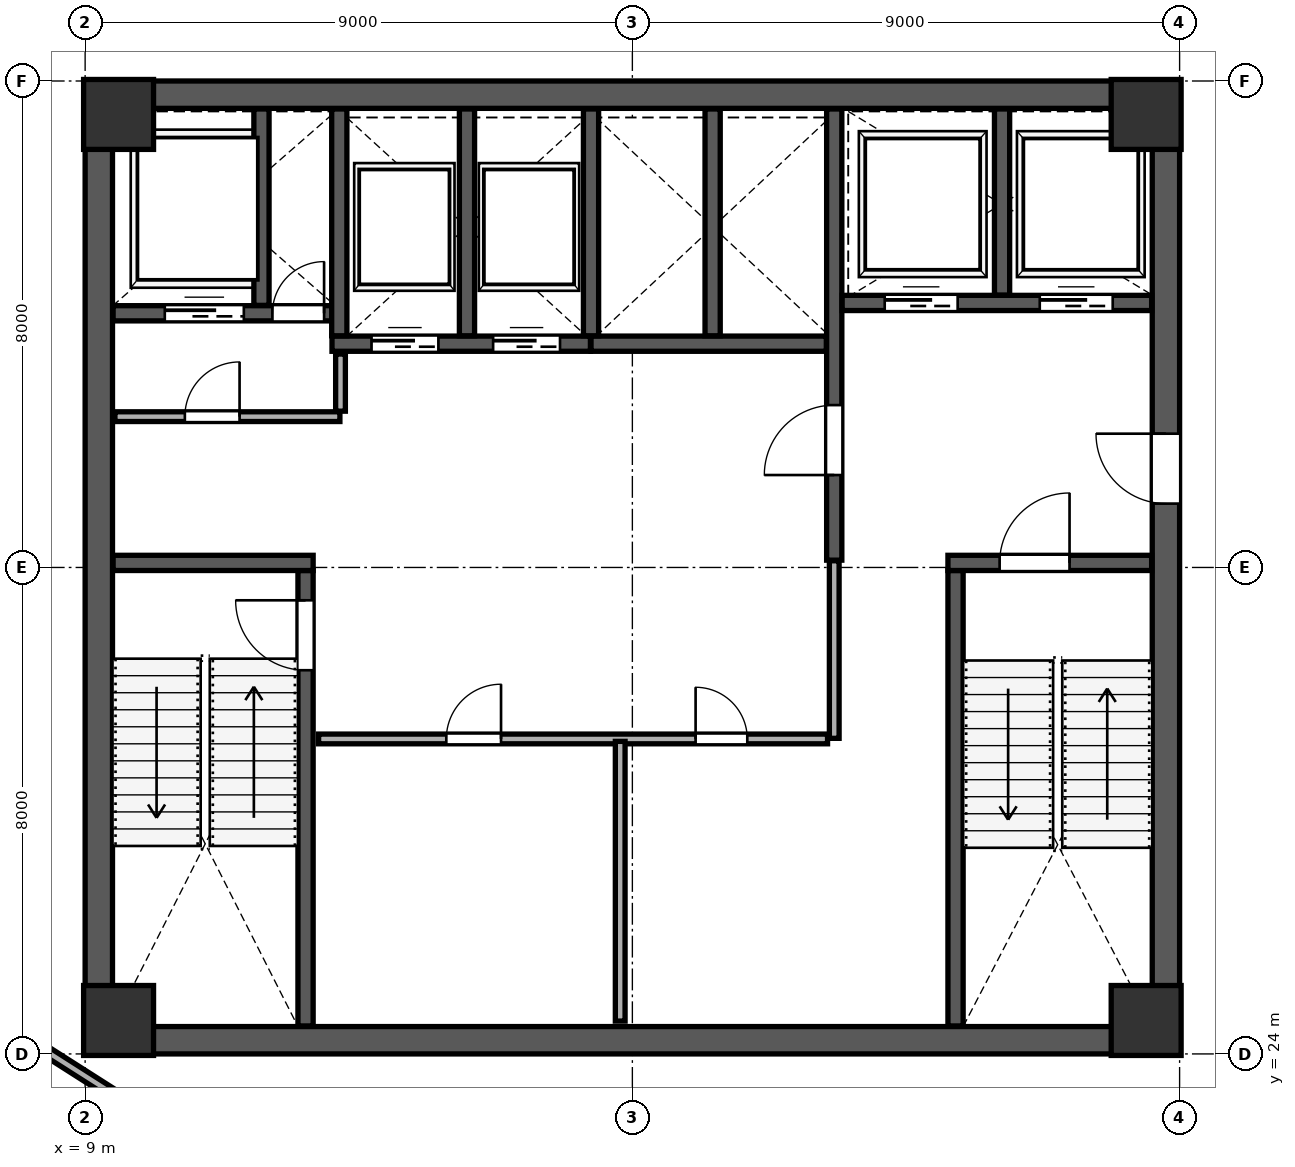
"""IFC4 building model, lengths in metres.
Left out: names, types, materials, properties, quantities, classifications, styles, units other than length and angle.
Written with IfcOpenShell. Run it as: python <this file> out.ifc"""

import sys

from ifc_helpers import new_model, si_unit, direction, frame, frame_2d, origin, origin_2d, place, context, subcontext, project, spatial, rectangle, extrude, source, transform, mapped, element, fill, save


model = new_model("IFC4")
c1 = context("Model", 3, precision=1e-05, world=origin(), true_north=direction((0.0, 1.0)))
c2 = subcontext(c1, "Body", "Model", "MODEL_VIEW")
j1 = project(units=[si_unit("LENGTHUNIT", "METRE"), si_unit("PLANEANGLEUNIT", "RADIAN")], contexts=[c1])
p1 = place(None, origin())
s1 = spatial("IfcSite", under=j1, at=p1, CompositionType="ELEMENT")
p2 = place(p1, origin())
s2 = spatial("IfcBuilding", under=s1, at=p2, CompositionType="ELEMENT")
p3 = place(p2, frame((0.0, 0.0, 187.6)))
s3 = spatial("IfcBuildingStorey", under=s2, at=p3, CompositionType="ELEMENT", Elevation=187.6)
m1 = source(origin(), c2, "Body", "SweptSolid", [
    extrude(rectangle(XDim=1.15, YDim=1.15, at=origin_2d()), origin(), (0.0, 0.0, 1.0), 4.198),
])
for number, where, z_axis, x_axis in (
    (1, (9.55, 24.55, 0.001), (0.0, 0.0, 1.0), (1.0, 0.0, 0.0)),
    (2, (26.45, 24.55, 0.001), (0.0, 0.0, 1.0), (1.0, 0.0, 0.0)),
    (3, (9.55, 39.45, 0.001), (0.0, 0.0, 1.0), (1.0, 0.0, 0.0)),
    (4, (26.45, 39.45, 0.001), (0.0, 0.0, 1.0), (1.0, 0.0, 0.0)),
):
    element("IfcColumn", number, at=place(p3, frame(where, z_axis=z_axis, x_axis=x_axis)), inside=s3, PredefinedType="COLUMN", context=c2, shape_type="MappedRepresentation", body=[
        mapped(m1, transform((0.0, 0.0, 0.0), scale=1.0)),
    ])
p4 = place(p3, frame((9.225, 24.45, 0.0), z_axis=(0.0, 0.0, 1.0), x_axis=(0.0, 1.0, 0.0)))
e5 = element("IfcWall", 5, at=p4, inside=s3, PredefinedType="SHEAR", context=c2, shape_type="SweptSolid", body=[
    extrude(rectangle(XDim=15.1, YDim=0.45, at=frame_2d((7.55, 0.0))), origin(), (0.0, 0.0, 1.0), 3.96),
])
p5 = place(p3, frame((26.775, 24.45, 0.0), z_axis=(0.0, 0.0, 1.0), x_axis=(0.0, 1.0, 0.0)))
e6 = element("IfcWall", 6, at=p5, inside=s3, PredefinedType="SHEAR", context=c2, shape_type="SweptSolid", body=[
    extrude(rectangle(XDim=15.1, YDim=0.45, at=frame_2d((7.55, 0.0))), origin(), (0.0, 0.0, 1.0), 3.96),
])
p6 = place(p5, frame((8.6, 0.0, 0.0)))
e7 = element("IfcOpeningElement", 7, at=p6, cuts=e6, PredefinedType="OPENING", context=c2, shape_type="SweptSolid", body=[
    extrude(rectangle(XDim=1.15, YDim=2.2, at=frame_2d((0.575, 1.1))), frame((0.0, 0.235, 0.0), z_axis=(0.0, -1.0, 0.0), x_axis=(1.0, 0.0, 0.0)), (0.0, 0.0, 1.0), 0.47),
])
for number, where, z_axis, x_axis in (
    (8, (9.0, 24.225, 0.0), (0.0, 0.0, 1.0), (1.0, 0.0, 0.0)),
    (9, (9.0, 39.775, 0.0), (0.0, 0.0, 1.0), (1.0, 0.0, 0.0)),
):
    element("IfcWall", number, at=place(p3, frame(where, z_axis=z_axis, x_axis=x_axis)), inside=s3, PredefinedType="SHEAR", context=c2, shape_type="SweptSolid", body=[
        extrude(rectangle(XDim=18.0, YDim=0.45, at=frame_2d((9.0, 0.0))), origin(), (0.0, 0.0, 1.0), 3.96),
    ])
p7 = place(p3, frame((12.625, 24.46, 0.0), z_axis=(0.0, 0.0, 1.0), x_axis=(0.0, 1.0, 0.0)))
e10 = element("IfcWall", 10, at=p7, inside=s3, PredefinedType="SHEAR", context=c2, shape_type="SweptSolid", body=[
    extrude(rectangle(XDim=7.49, YDim=0.25, at=frame_2d((3.745, 0.0))), origin(), (0.0, 0.0, 1.0), 3.96),
])
p8 = place(p7, frame((5.85, 0.0, 0.0)))
e11 = element("IfcOpeningElement", 11, at=p8, cuts=e10, PredefinedType="OPENING", context=c2, shape_type="SweptSolid", body=[
    extrude(rectangle(XDim=1.15, YDim=2.2, at=frame_2d((0.575, 1.1))), frame((0.0, 0.135, 0.0), z_axis=(0.0, -1.0, 0.0), x_axis=(1.0, 0.0, 0.0)), (0.0, 0.0, 1.0), 0.27),
])
p9 = place(p3, frame((9.46, 32.075, 0.0), z_axis=(0.0, 0.0, 1.0), x_axis=(1.0, 0.0, 0.0)))
e12 = element("IfcWall", 12, at=p9, inside=s3, PredefinedType="SHEAR", context=c2, shape_type="SweptSolid", body=[
    extrude(rectangle(XDim=3.29, YDim=0.25, at=frame_2d((1.645, 0.0))), origin(), (0.0, 0.0, 1.0), 3.96),
])
p10 = place(p3, frame((23.315, 24.46, 0.0), z_axis=(0.0, 0.0, 1.0), x_axis=(0.0, 1.0, 0.0)))
e13 = element("IfcWall", 13, at=p10, inside=s3, PredefinedType="SHEAR", context=c2, shape_type="SweptSolid", body=[
    extrude(rectangle(XDim=7.49, YDim=0.25, at=frame_2d((3.745, 0.0))), origin(), (0.0, 0.0, 1.0), 3.96),
])
p11 = place(p3, frame((23.19, 32.075, 0.0), z_axis=(0.0, 0.0, 1.0), x_axis=(1.0, 0.0, 0.0)))
e14 = element("IfcWall", 14, at=p11, inside=s3, PredefinedType="SHEAR", context=c2, shape_type="SweptSolid", body=[
    extrude(rectangle(XDim=3.35, YDim=0.25, at=frame_2d((1.675, 0.0))), origin(), (0.0, 0.0, 1.0), 3.96),
])
p12 = place(p11, frame((0.85, 0.0, 0.0)))
e15 = element("IfcOpeningElement", 15, at=p12, cuts=e14, PredefinedType="OPENING", context=c2, shape_type="SweptSolid", body=[
    extrude(rectangle(XDim=1.15, YDim=2.2, at=frame_2d((0.575, 1.1))), frame((0.0, 0.135, 0.0), z_axis=(0.0, -1.0, 0.0), x_axis=(1.0, 0.0, 0.0)), (0.0, 0.0, 1.0), 0.27),
])
p13 = place(p3, frame((21.32, 32.12, 0.0), z_axis=(0.0, 0.0, 1.0), x_axis=(0.0, 1.0, 0.0)))
e16 = element("IfcWall", 16, at=p13, inside=s3, PredefinedType="SHEAR", context=c2, shape_type="SweptSolid", body=[
    extrude(rectangle(XDim=7.42, YDim=0.25, at=frame_2d((3.71, 0.0))), origin(), (0.0, 0.0, 1.0), 3.96),
])
p14 = place(p13, frame((1.4, 0.0, 0.0)))
e17 = element("IfcOpeningElement", 17, at=p14, cuts=e16, PredefinedType="OPENING", context=c2, shape_type="SweptSolid", body=[
    extrude(rectangle(XDim=1.15, YDim=2.2, at=frame_2d((0.575, 1.1))), frame((0.0, 0.135, 0.0), z_axis=(0.0, -1.0, 0.0), x_axis=(1.0, 0.0, 0.0)), (0.0, 0.0, 1.0), 0.27),
])
p15 = place(p3, frame((9.46, 36.18, 0.0), z_axis=(0.0, 0.0, 1.0), x_axis=(1.0, 0.0, 0.0)))
e18 = element("IfcWall", 18, at=p15, inside=s3, PredefinedType="SHEAR", context=c2, shape_type="SweptSolid", body=[
    extrude(rectangle(XDim=3.79, YDim=0.25, at=frame_2d((1.895, 0.0))), origin(), (0.0, 0.0, 1.0), 3.96),
])
p16 = place(p15, frame((2.62, 0.0, 0.0)))
e19 = element("IfcOpeningElement", 19, at=p16, cuts=e18, PredefinedType="OPENING", context=c2, shape_type="SweptSolid", body=[
    extrude(rectangle(XDim=0.85, YDim=2.1, at=frame_2d((0.425, 1.05))), frame((0.0, 0.135, 0.0), z_axis=(0.0, -1.0, 0.0), x_axis=(1.0, 0.0, 0.0)), (0.0, 0.0, 1.0), 0.27),
])
p17 = place(p15, frame((0.85, 0.0, 0.0)))
e20 = element("IfcOpeningElement", 20, at=p17, cuts=e18, PredefinedType="OPENING", context=c2, shape_type="SweptSolid", body=[
    extrude(rectangle(XDim=1.3, YDim=2.25, at=frame_2d((0.65, 1.125))), frame((0.0, 0.135, 0.0), z_axis=(0.0, -1.0, 0.0), x_axis=(1.0, 0.0, 0.0)), (0.0, 0.0, 1.0), 0.27),
])
p18 = place(p3, frame((11.9, 36.31, 0.0), z_axis=(0.0, 0.0, 1.0), x_axis=(0.0, 1.0, 0.0)))
e21 = element("IfcWall", 21, at=p18, inside=s3, PredefinedType="SHEAR", context=c2, shape_type="SweptSolid", body=[
    extrude(rectangle(XDim=3.23, YDim=0.25, at=frame_2d((1.615, 0.0))), origin(), (0.0, 0.0, 1.0), 3.96),
])
p19 = place(p3, frame((21.45, 36.35, 0.0), z_axis=(0.0, 0.0, 1.0), x_axis=(1.0, 0.0, 0.0)))
e22 = element("IfcWall", 22, at=p19, inside=s3, PredefinedType="SHEAR", context=c2, shape_type="SweptSolid", body=[
    extrude(rectangle(XDim=5.09, YDim=0.25, at=frame_2d((2.545, 0.0))), origin(), (0.0, 0.0, 1.0), 3.96),
])
p20 = place(p19, frame((0.7, 0.0, 0.0)))
e23 = element("IfcOpeningElement", 23, at=p20, cuts=e22, PredefinedType="OPENING", context=c2, shape_type="SweptSolid", body=[
    extrude(rectangle(XDim=1.2, YDim=2.2, at=frame_2d((0.6, 1.1))), frame((0.0, 0.135, 0.0), z_axis=(0.0, -1.0, 0.0), x_axis=(1.0, 0.0, 0.0)), (0.0, 0.0, 1.0), 0.27),
])
p21 = place(p19, frame((3.25, 0.0, 0.0)))
e24 = element("IfcOpeningElement", 24, at=p21, cuts=e22, PredefinedType="OPENING", context=c2, shape_type="SweptSolid", body=[
    extrude(rectangle(XDim=1.2, YDim=2.2, at=frame_2d((0.6, 1.1))), frame((0.0, 0.135, 0.0), z_axis=(0.0, -1.0, 0.0), x_axis=(1.0, 0.0, 0.0)), (0.0, 0.0, 1.0), 0.27),
])
p22 = place(p3, frame((24.08, 36.48, 0.0), z_axis=(0.0, 0.0, 1.0), x_axis=(0.0, 1.0, 0.0)))
e25 = element("IfcWall", 25, at=p22, inside=s3, PredefinedType="SHEAR", context=c2, shape_type="SweptSolid", body=[
    extrude(rectangle(XDim=3.06, YDim=0.25, at=frame_2d((1.53, 0.0))), origin(), (0.0, 0.0, 1.0), 3.96),
])
p23 = place(p3, frame((13.06, 35.68, 0.0), z_axis=(0.0, 0.0, 1.0), x_axis=(1.0, 0.0, 0.0)))
e26 = element("IfcWall", 26, at=p23, inside=s3, PredefinedType="SHEAR", context=c2, shape_type="SweptSolid", body=[
    extrude(rectangle(XDim=4.25, YDim=0.25, at=frame_2d((2.125, 0.0))), origin(), (0.0, 0.0, 1.0), 3.96),
])
p24 = place(p23, frame((0.65, 0.0, 0.0)))
e27 = element("IfcOpeningElement", 27, at=p24, cuts=e26, PredefinedType="OPENING", context=c2, shape_type="SweptSolid", body=[
    extrude(rectangle(XDim=1.1, YDim=2.2, at=frame_2d((0.55, 1.1))), frame((0.0, 0.135, 0.0), z_axis=(0.0, -1.0, 0.0), x_axis=(1.0, 0.0, 0.0)), (0.0, 0.0, 1.0), 0.27),
])
p25 = place(p23, frame((2.65, 0.0, 0.0)))
e28 = element("IfcOpeningElement", 28, at=p25, cuts=e26, PredefinedType="OPENING", context=c2, shape_type="SweptSolid", body=[
    extrude(rectangle(XDim=1.1, YDim=2.2, at=frame_2d((0.55, 1.1))), frame((0.0, 0.135, 0.0), z_axis=(0.0, -1.0, 0.0), x_axis=(1.0, 0.0, 0.0)), (0.0, 0.0, 1.0), 0.27),
])
for number, where, z_axis, x_axis in (
    (29, (13.18, 35.81, 0.0), (0.0, 0.0, 1.0), (0.0, 1.0, 0.0)),
    (30, (15.28, 35.81, 0.0), (0.0, 0.0, 1.0), (0.0, 1.0, 0.0)),
):
    element("IfcWall", number, at=place(p3, frame(where, z_axis=z_axis, x_axis=x_axis)), inside=s3, PredefinedType="SHEAR", context=c2, shape_type="SweptSolid", body=[
        extrude(rectangle(XDim=3.73, YDim=0.25, at=frame_2d((1.865, 0.0))), origin(), (0.0, 0.0, 1.0), 3.96),
    ])
p26 = place(p3, frame((17.32, 35.68, 0.0), z_axis=(0.0, 0.0, 1.0), x_axis=(1.0, 0.0, 0.0)))
e31 = element("IfcWall", 31, at=p26, inside=s3, PredefinedType="SHEAR", context=c2, shape_type="SweptSolid", body=[
    extrude(rectangle(XDim=3.87, YDim=0.25, at=frame_2d((1.935, 0.0))), origin(), (0.0, 0.0, 1.0), 3.96),
])
for number, where, z_axis, x_axis in (
    (32, (17.32, 35.81, 0.0), (0.0, 0.0, 1.0), (0.0, 1.0, 0.0)),
    (33, (19.32, 35.81, 0.0), (0.0, 0.0, 1.0), (0.0, 1.0, 0.0)),
):
    element("IfcWall", number, at=place(p3, frame(where, z_axis=z_axis, x_axis=x_axis)), inside=s3, PredefinedType="SHEAR", context=c2, shape_type="SweptSolid", body=[
        extrude(rectangle(XDim=3.73, YDim=0.25, at=frame_2d((1.865, 0.0))), origin(), (0.0, 0.0, 1.0), 3.96),
    ])
p27 = place(p3, frame((9.49, 34.48, 0.0), z_axis=(0.0, 0.0, 1.0), x_axis=(1.0, 0.0, 0.0)))
e34 = element("IfcWall", 34, at=p27, inside=s3, PredefinedType="PARTITIONING", context=c2, shape_type="SweptSolid", body=[
    extrude(rectangle(XDim=3.7, YDim=0.16, at=frame_2d((1.85, 0.0))), origin(), (0.0, 0.0, 1.0), 3.96),
])
p28 = place(p27, frame((1.15, 0.0, 0.0)))
e35 = element("IfcOpeningElement", 35, at=p28, cuts=e34, PredefinedType="OPENING", context=c2, shape_type="SweptSolid", body=[
    extrude(rectangle(XDim=0.9, YDim=2.15, at=frame_2d((0.45, 1.075))), frame((0.0, 0.09, 0.0), z_axis=(0.0, -1.0, 0.0), x_axis=(1.0, 0.0, 0.0)), (0.0, 0.0, 1.0), 0.18),
])
p29 = place(p3, frame((13.2, 34.57, 0.0), z_axis=(0.0, 0.0, 1.0), x_axis=(0.0, 1.0, 0.0)))
e36 = element("IfcWall", 36, at=p29, inside=s3, PredefinedType="PARTITIONING", context=c2, shape_type="SweptSolid", body=[
    extrude(rectangle(XDim=0.94, YDim=0.16, at=frame_2d((0.47, 0.0))), origin(), (0.0, 0.0, 1.0), 3.96),
])
p30 = place(p3, frame((12.84, 29.18, 0.0), z_axis=(0.0, 0.0, 1.0), x_axis=(1.0, 0.0, 0.0)))
e37 = element("IfcWall", 37, at=p30, inside=s3, PredefinedType="PARTITIONING", context=c2, shape_type="SweptSolid", body=[
    extrude(rectangle(XDim=8.37, YDim=0.16, at=frame_2d((4.185, 0.0))), origin(), (0.0, 0.0, 1.0), 3.96),
])
p31 = place(p30, frame((2.1, 0.0, 0.0)))
e38 = element("IfcOpeningElement", 38, at=p31, cuts=e37, PredefinedType="OPENING", context=c2, shape_type="SweptSolid", body=[
    extrude(rectangle(XDim=0.9, YDim=2.15, at=frame_2d((0.45, 1.075))), frame((0.0, 0.09, 0.0), z_axis=(0.0, -1.0, 0.0), x_axis=(1.0, 0.0, 0.0)), (0.0, 0.0, 1.0), 0.18),
])
p32 = place(p30, frame((6.2, 0.0, 0.0)))
e39 = element("IfcOpeningElement", 39, at=p32, cuts=e37, PredefinedType="OPENING", context=c2, shape_type="SweptSolid", body=[
    extrude(rectangle(XDim=0.85, YDim=2.1, at=frame_2d((0.425, 1.05))), frame((0.0, 0.09, 0.0), z_axis=(0.0, -1.0, 0.0), x_axis=(1.0, 0.0, 0.0)), (0.0, 0.0, 1.0), 0.18),
])
p33 = place(p3, frame((17.8, 24.54, 0.0), z_axis=(0.0, 0.0, 1.0), x_axis=(0.0, 1.0, 0.0)))
e40 = element("IfcWall", 40, at=p33, inside=s3, PredefinedType="PARTITIONING", context=c2, shape_type="SweptSolid", body=[
    extrude(rectangle(XDim=4.6, YDim=0.16, at=frame_2d((2.3, 0.0))), origin(), (0.0, 0.0, 1.0), 3.96),
])
p34 = place(p3, frame((21.32, 29.19, 0.0), z_axis=(0.0, 0.0, 1.0), x_axis=(0.0, 1.0, 0.0)))
e41 = element("IfcWall", 41, at=p34, inside=s3, PredefinedType="PARTITIONING", context=c2, shape_type="SweptSolid", body=[
    extrude(rectangle(XDim=2.92, YDim=0.16, at=frame_2d((1.46, 0.0))), origin(), (0.0, 0.0, 1.0), 3.96),
])
p35 = place(p3, frame((6.25, 25.389, 0.0), z_axis=(0.0, 0.0, 1.0), x_axis=(0.843390478307, -0.537301127024, 0.0)))
e42 = element("IfcWall", 42, at=p35, inside=s3, PredefinedType="PARTITIONING", context=c2, shape_type="SweptSolid", body=[
    extrude(rectangle(XDim=20.15, YDim=0.16, at=frame_2d((10.075, 0.0))), origin(), (0.0, 0.0, 1.0), 3.96),
])
p36 = place(p35, frame((0.65, 0.0, 0.0)))
e43 = element("IfcOpeningElement", 43, at=p36, cuts=e42, PredefinedType="OPENING", context=c2, shape_type="SweptSolid", body=[
    extrude(rectangle(XDim=0.95, YDim=2.15, at=frame_2d((0.475, 1.075))), frame((0.0, 0.09, 0.0), z_axis=(0.0, -1.0, 0.0), x_axis=(1.0, 0.0, 0.0)), (0.0, 0.0, 1.0), 0.18),
])
p37 = place(p3, frame((12.747, 50.868, 0.0), z_axis=(0.0, 0.0, 1.0), x_axis=(0.843393047262, -0.537297094567, 0.0)))
e44 = element("IfcWall", 44, at=p37, inside=s3, PredefinedType="PARTITIONING", context=c2, shape_type="SweptSolid", body=[
    extrude(rectangle(XDim=28.36, YDim=0.135, at=frame_2d((14.18, 0.0))), origin(), (0.0, 0.0, 1.0), 3.96),
])
p38 = place(p37, frame((20.31, 0.0, 0.0)))
e45 = element("IfcOpeningElement", 45, at=p38, cuts=e44, PredefinedType="OPENING", context=c2, shape_type="SweptSolid", body=[
    extrude(rectangle(XDim=0.95, YDim=2.15, at=frame_2d((0.475, 1.075))), frame((0.0, 0.078, 0.0), z_axis=(0.0, -1.0, 0.0), x_axis=(1.0, 0.0, 0.0)), (0.0, 0.0, 1.0), 0.155),
])
m2 = source(origin(), c2, "Body", "SweptSolid", [
    extrude(rectangle(XDim=1.15, YDim=2.2, at=frame_2d((0.575, 1.1))), frame((0.0, 0.025, 0.0), z_axis=(0.0, -1.0, 0.0), x_axis=(1.0, 0.0, 0.0)), (0.0, 0.0, 1.0), 0.05),
])
p39 = place(p8, origin())
e46 = element("IfcDoor", 46, at=p39, inside=s3, OperationType="SINGLE_SWING_RIGHT", PredefinedType="DOOR", context=c2, shape_type="MappedRepresentation", body=[
    mapped(m2, transform((0.0, 0.0, 0.0), scale=1.0)),
])
fill(e11, e46)
m3 = source(origin(), c2, "Body", "SweptSolid", [
    extrude(rectangle(XDim=1.15, YDim=2.2, at=frame_2d((0.575, 1.1))), frame((0.0, 0.025, 0.0), z_axis=(0.0, -1.0, 0.0), x_axis=(1.0, 0.0, 0.0)), (0.0, 0.0, 1.0), 0.05),
])
p40 = place(p14, origin())
e47 = element("IfcDoor", 47, at=p40, inside=s3, OperationType="SINGLE_SWING_LEFT", PredefinedType="DOOR", context=c2, shape_type="MappedRepresentation", body=[
    mapped(m3, transform((0.0, 0.0, 0.0), scale=1.0)),
])
fill(e17, e47)
p41 = place(p12, origin())
e48 = element("IfcDoor", 48, at=p41, inside=s3, OperationType="SINGLE_SWING_RIGHT", PredefinedType="DOOR", context=c2, shape_type="MappedRepresentation", body=[
    mapped(m2, transform((0.0, 0.0, 0.0), scale=1.0)),
])
fill(e15, e48)
p42 = place(p6, origin())
e49 = element("IfcDoor", 49, at=p42, inside=s3, OperationType="SINGLE_SWING_RIGHT", PredefinedType="DOOR", context=c2, shape_type="MappedRepresentation", body=[
    mapped(m3, transform((0.0, 0.0, 0.0), scale=1.0)),
])
fill(e7, e49)
m4 = source(origin(), c2, "Body", "SweptSolid", [
    extrude(rectangle(XDim=0.85, YDim=2.1, at=frame_2d((0.425, 1.05))), frame((0.0, 0.025, 0.0), z_axis=(0.0, -1.0, 0.0), x_axis=(1.0, 0.0, 0.0)), (0.0, 0.0, 1.0), 0.05),
])
p43 = place(p16, origin())
e50 = element("IfcDoor", 50, at=p43, inside=s3, OperationType="SINGLE_SWING_RIGHT", PredefinedType="DOOR", context=c2, shape_type="MappedRepresentation", body=[
    mapped(m4, transform((0.0, 0.0, 0.0), scale=1.0)),
])
fill(e19, e50)
m5 = source(origin(), c2, "Body", "SweptSolid", [
    extrude(rectangle(XDim=1.1, YDim=2.2, at=frame_2d((0.55, 1.1))), frame((0.0, 0.025, 0.0), z_axis=(0.0, -1.0, 0.0), x_axis=(1.0, 0.0, 0.0)), (0.0, 0.0, 1.0), 0.05),
])
p44 = place(p24, origin())
e51 = element("IfcDoor", 51, at=p44, inside=s3, OperationType="SLIDING_TO_LEFT", PredefinedType="DOOR", context=c2, shape_type="MappedRepresentation", body=[
    mapped(m5, transform((0.0, 0.0, 0.0), scale=1.0)),
])
fill(e27, e51)
p45 = place(p25, origin())
e52 = element("IfcDoor", 52, at=p45, inside=s3, OperationType="SLIDING_TO_RIGHT", PredefinedType="DOOR", context=c2, shape_type="MappedRepresentation", body=[
    mapped(m5, transform((0.0, 0.0, 0.0), scale=1.0)),
])
fill(e28, e52)
m6 = source(origin(), c2, "Body", "SweptSolid", [
    extrude(rectangle(XDim=1.2, YDim=2.2, at=frame_2d((0.6, 1.1))), frame((0.0, 0.025, 0.0), z_axis=(0.0, -1.0, 0.0), x_axis=(1.0, 0.0, 0.0)), (0.0, 0.0, 1.0), 0.05),
])
p46 = place(p20, origin())
e53 = element("IfcDoor", 53, at=p46, inside=s3, OperationType="SLIDING_TO_LEFT", PredefinedType="DOOR", context=c2, shape_type="MappedRepresentation", body=[
    mapped(m6, transform((0.0, 0.0, 0.0), scale=1.0)),
])
fill(e23, e53)
p47 = place(p21, origin())
e54 = element("IfcDoor", 54, at=p47, inside=s3, OperationType="SLIDING_TO_RIGHT", PredefinedType="DOOR", context=c2, shape_type="MappedRepresentation", body=[
    mapped(m6, transform((0.0, 0.0, 0.0), scale=1.0)),
])
fill(e24, e54)
m7 = source(origin(), c2, "Body", "SweptSolid", [
    extrude(rectangle(XDim=1.3, YDim=2.25, at=frame_2d((0.65, 1.125))), frame((0.0, 0.025, 0.0), z_axis=(0.0, -1.0, 0.0), x_axis=(1.0, 0.0, 0.0)), (0.0, 0.0, 1.0), 0.05),
])
p48 = place(p17, origin())
e55 = element("IfcDoor", 55, at=p48, inside=s3, OperationType="SLIDING_TO_LEFT", PredefinedType="DOOR", context=c2, shape_type="MappedRepresentation", body=[
    mapped(m7, transform((0.0, 0.0, 0.0), scale=1.0)),
])
fill(e20, e55)
m8 = source(origin(), c2, "Body", "SweptSolid", [
    extrude(rectangle(XDim=0.9, YDim=2.15, at=frame_2d((0.45, 1.075))), frame((0.0, 0.025, 0.0), z_axis=(0.0, -1.0, 0.0), x_axis=(1.0, 0.0, 0.0)), (0.0, 0.0, 1.0), 0.05),
])
p49 = place(p28, origin())
e56 = element("IfcDoor", 56, at=p49, inside=s3, OperationType="SINGLE_SWING_RIGHT", PredefinedType="DOOR", context=c2, shape_type="MappedRepresentation", body=[
    mapped(m8, transform((0.0, 0.0, 0.0), scale=1.0)),
])
fill(e35, e56)
p50 = place(p31, origin())
e57 = element("IfcDoor", 57, at=p50, inside=s3, OperationType="SINGLE_SWING_RIGHT", PredefinedType="DOOR", context=c2, shape_type="MappedRepresentation", body=[
    mapped(m8, transform((0.0, 0.0, 0.0), scale=1.0)),
])
fill(e38, e57)
p51 = place(p32, origin())
e58 = element("IfcDoor", 58, at=p51, inside=s3, OperationType="SINGLE_SWING_LEFT", PredefinedType="DOOR", context=c2, shape_type="MappedRepresentation", body=[
    mapped(m4, transform((0.0, 0.0, 0.0), scale=1.0)),
])
fill(e39, e58)
save(model, sys.argv[1])
